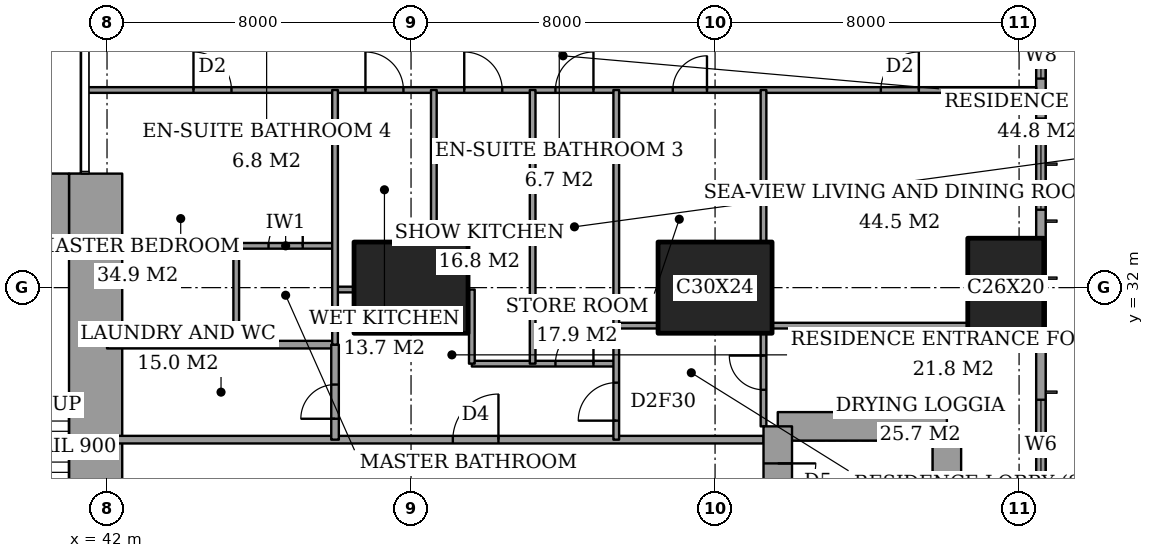
"""IFC4 building model, lengths in metres.
Left out: names, types, materials, properties, quantities, classifications, styles, units other than length and angle.
Written with IfcOpenShell. Run it as: python <this file> out.ifc"""

import sys

from ifc_helpers import new_model, si_unit, direction, frame, frame_2d, origin, origin_2d, place, context, subcontext, project, spatial, rectangle, extrude, element, fill, save


model = new_model("IFC4")
c1 = context("Model", 3, precision=1e-05, world=origin(), true_north=direction((0.0, 1.0)))
c2 = subcontext(c1, "Body", "Model", "MODEL_VIEW")
j1 = project(units=[si_unit("LENGTHUNIT", "METRE"), si_unit("PLANEANGLEUNIT", "RADIAN")], contexts=[c1])
p1 = place(None, origin())
s1 = spatial("IfcSite", under=j1, at=p1, CompositionType="ELEMENT")
p2 = place(p1, origin())
s2 = spatial("IfcBuilding", under=s1, at=p2, CompositionType="ELEMENT")
p3 = place(p2, frame((0.0, 0.0, 58.4)))
s3 = spatial("IfcBuildingStorey", under=s2, at=p3, CompositionType="ELEMENT", Elevation=58.4)
for number, where, z_axis, x_axis in (
    (1, (50.0, 32.0, 0.0), (0.0, 0.0, 1.0), (1.0, 0.0, 0.0)),
    (2, (58.0, 32.0, 0.0), (0.0, 0.0, 1.0), (1.0, 0.0, 0.0)),
):
    element("IfcColumn", number, at=place(p3, frame(where, z_axis=z_axis, x_axis=x_axis)), inside=s3, PredefinedType="COLUMN", context=c2, shape_type="SweptSolid", body=[
        extrude(rectangle(XDim=3.0, YDim=2.4, at=origin_2d()), origin(), (0.0, 0.0, 1.0), 3.6),
    ])
p4 = place(p3, frame((65.65, 32.0, 0.0), z_axis=(0.0, 0.0, 1.0), x_axis=(0.0, 1.0, 0.0)))
e3 = element("IfcColumn", 3, at=p4, inside=s3, PredefinedType="COLUMN", context=c2, shape_type="SweptSolid", body=[
    extrude(rectangle(XDim=2.6, YDim=2.0, at=origin_2d()), origin(), (0.0, 0.0, 1.0), 3.6),
])
p5 = place(p3, frame((37.85, 34.0, 0.0), z_axis=(0.0, 0.0, 1.0), x_axis=(1.0, 0.0, 0.0)))
e4 = element("IfcWall", 4, at=p5, inside=s3, PredefinedType="SHEAR", context=c2, shape_type="SweptSolid", body=[
    extrude(rectangle(XDim=3.15, YDim=2.0, at=frame_2d((1.575, 0.0))), origin(), (0.0, 0.0, 1.0), 3.6),
])
p6 = place(p3, frame((41.7, 24.85, 0.0), z_axis=(0.0, 0.0, 1.0), x_axis=(0.0, 1.0, 0.0)))
e5 = element("IfcWall", 5, at=p6, inside=s3, PredefinedType="SHEAR", context=c2, shape_type="SweptSolid", body=[
    extrude(rectangle(XDim=10.15, YDim=1.4, at=frame_2d((5.075, 0.0))), origin(), (0.0, 0.0, 1.0), 3.6),
])
p7 = place(p3, frame((64.1, 19.65, 0.0), z_axis=(0.0, 0.0, 1.0), x_axis=(0.0, 1.0, 0.0)))
e6 = element("IfcWall", 6, at=p7, inside=s3, PredefinedType="SHEAR", context=c2, shape_type="SweptSolid", body=[
    extrude(rectangle(XDim=8.7, YDim=0.75, at=frame_2d((4.35, 0.0))), origin(), (0.0, 0.0, 1.0), 3.6),
])
p8 = place(p3, frame((64.1, 28.35, 0.0), z_axis=(0.0, 0.0, 1.0), x_axis=(-1.0, 0.0, 0.0)))
e7 = element("IfcWall", 7, at=p8, inside=s3, PredefinedType="SHEAR", context=c2, shape_type="SweptSolid", body=[
    extrude(rectangle(XDim=4.45, YDim=0.75, at=frame_2d((2.225, 0.0))), origin(), (0.0, 0.0, 1.0), 3.6),
])
p9 = place(p3, frame((59.65, 28.35, 0.0), z_axis=(0.0, 0.0, 1.0), x_axis=(0.0, -1.0, 0.0)))
e8 = element("IfcWall", 8, at=p9, inside=s3, PredefinedType="SHEAR", context=c2, shape_type="SweptSolid", body=[
    extrude(rectangle(XDim=8.7, YDim=0.75, at=frame_2d((4.35, 0.0))), origin(), (0.0, 0.0, 1.0), 3.6),
])
p10 = place(p9, frame((0.975, 0.0, 0.0)))
e9 = element("IfcOpeningElement", 9, at=p10, cuts=e8, PredefinedType="OPENING", context=c2, shape_type="SweptSolid", body=[
    extrude(rectangle(XDim=1.0, YDim=2.1, at=frame_2d((0.5, 1.05))), frame((0.0, 0.385, 0.0), z_axis=(0.0, -1.0, 0.0), x_axis=(1.0, 0.0, 0.0)), (0.0, 0.0, 1.0), 0.77),
])
p11 = place(p3, frame((66.575, 3.175, 0.0), z_axis=(0.0, 0.0, 1.0), x_axis=(0.0, 1.0, 0.0)))
e10 = element("IfcWall", 10, at=p11, inside=s3, PredefinedType="SOLIDWALL", context=c2, shape_type="SweptSolid", body=[
    extrude(rectangle(XDim=41.65, YDim=0.25, at=frame_2d((20.825, 0.0))), origin(), (0.0, 0.0, 1.0), 3.6),
])
p12 = place(p11, frame((0.775, 0.0, 0.6)))
e11 = element("IfcOpeningElement", 11, at=p12, cuts=e10, PredefinedType="OPENING", context=c2, shape_type="SweptSolid", body=[
    extrude(rectangle(XDim=2.4, YDim=2.0, at=frame_2d((1.2, 1.0))), frame((0.0, 0.135, 0.0), z_axis=(0.0, -1.0, 0.0), x_axis=(1.0, 0.0, 0.0)), (0.0, 0.0, 1.0), 0.27),
])
p13 = place(p11, frame((6.1, 0.0, 0.6)))
e12 = element("IfcOpeningElement", 12, at=p13, cuts=e10, PredefinedType="OPENING", context=c2, shape_type="SweptSolid", body=[
    extrude(rectangle(XDim=1.2, YDim=2.0, at=frame_2d((0.6, 1.0))), frame((0.0, 0.135, 0.0), z_axis=(0.0, -1.0, 0.0), x_axis=(1.0, 0.0, 0.0)), (0.0, 0.0, 1.0), 0.27),
])
p14 = place(p11, frame((8.275, 0.0, 0.6)))
e13 = element("IfcOpeningElement", 13, at=p14, cuts=e10, PredefinedType="OPENING", context=c2, shape_type="SweptSolid", body=[
    extrude(rectangle(XDim=2.4, YDim=2.0, at=frame_2d((1.2, 1.0))), frame((0.0, 0.135, 0.0), z_axis=(0.0, -1.0, 0.0), x_axis=(1.0, 0.0, 0.0)), (0.0, 0.0, 1.0), 0.27),
])
p15 = place(p11, frame((15.775, 0.0, 0.6)))
e14 = element("IfcOpeningElement", 14, at=p15, cuts=e10, PredefinedType="OPENING", context=c2, shape_type="SweptSolid", body=[
    extrude(rectangle(XDim=2.4, YDim=2.0, at=frame_2d((1.2, 1.0))), frame((0.0, 0.135, 0.0), z_axis=(0.0, -1.0, 0.0), x_axis=(1.0, 0.0, 0.0)), (0.0, 0.0, 1.0), 0.27),
])
p16 = place(p11, frame((23.475, 0.0, 0.6)))
e15 = element("IfcOpeningElement", 15, at=p16, cuts=e10, PredefinedType="OPENING", context=c2, shape_type="SweptSolid", body=[
    extrude(rectangle(XDim=2.4, YDim=2.0, at=frame_2d((1.2, 1.0))), frame((0.0, 0.135, 0.0), z_axis=(0.0, -1.0, 0.0), x_axis=(1.0, 0.0, 0.0)), (0.0, 0.0, 1.0), 0.27),
])
p17 = place(p11, frame((30.875, 0.0, 0.6)))
e16 = element("IfcOpeningElement", 16, at=p17, cuts=e10, PredefinedType="OPENING", context=c2, shape_type="SweptSolid", body=[
    extrude(rectangle(XDim=2.4, YDim=2.0, at=frame_2d((1.2, 1.0))), frame((0.0, 0.135, 0.0), z_axis=(0.0, -1.0, 0.0), x_axis=(1.0, 0.0, 0.0)), (0.0, 0.0, 1.0), 0.27),
])
p18 = place(p11, frame((34.325, 0.0, 0.6)))
e17 = element("IfcOpeningElement", 17, at=p18, cuts=e10, PredefinedType="OPENING", context=c2, shape_type="SweptSolid", body=[
    extrude(rectangle(XDim=1.2, YDim=2.0, at=frame_2d((0.6, 1.0))), frame((0.0, 0.135, 0.0), z_axis=(0.0, -1.0, 0.0), x_axis=(1.0, 0.0, 0.0)), (0.0, 0.0, 1.0), 0.27),
])
p19 = place(p11, frame((38.475, 0.0, 0.6)))
e18 = element("IfcOpeningElement", 18, at=p19, cuts=e10, PredefinedType="OPENING", context=c2, shape_type="SweptSolid", body=[
    extrude(rectangle(XDim=2.4, YDim=2.0, at=frame_2d((1.2, 1.0))), frame((0.0, 0.135, 0.0), z_axis=(0.0, -1.0, 0.0), x_axis=(1.0, 0.0, 0.0)), (0.0, 0.0, 1.0), 0.27),
])
p20 = place(p3, frame((42.0, 28.0, 0.0), z_axis=(0.0, 0.0, 1.0), x_axis=(1.0, 0.0, 0.0)))
e19 = element("IfcWall", 19, at=p20, inside=s3, PredefinedType="PARTITIONING", context=c2, shape_type="SweptSolid", body=[
    extrude(rectangle(XDim=17.275, YDim=0.2, at=frame_2d((8.637, 0.0))), origin(), (0.0, 0.0, 1.0), 3.35),
])
p21 = place(p20, frame((9.1, 0.0, 0.0)))
e20 = element("IfcOpeningElement", 20, at=p21, cuts=e19, PredefinedType="OPENING", context=c2, shape_type="SweptSolid", body=[
    extrude(rectangle(XDim=1.2, YDim=2.4, at=frame_2d((0.6, 1.2))), frame((0.0, 0.11, 0.0), z_axis=(0.0, -1.0, 0.0), x_axis=(1.0, 0.0, 0.0)), (0.0, 0.0, 1.0), 0.22),
])
p22 = place(p3, frame((51.6, 30.0, 0.0), z_axis=(0.0, 0.0, 1.0), x_axis=(1.0, 0.0, 0.0)))
e21 = element("IfcWall", 21, at=p22, inside=s3, PredefinedType="PARTITIONING", context=c2, shape_type="SweptSolid", body=[
    extrude(rectangle(XDim=3.8, YDim=0.15, at=frame_2d((1.9, 0.0))), origin(), (0.0, 0.0, 1.0), 3.35),
])
p23 = place(p22, frame((2.2, 0.0, 0.0)))
e22 = element("IfcOpeningElement", 22, at=p23, cuts=e21, PredefinedType="OPENING", context=c2, shape_type="SweptSolid", body=[
    extrude(rectangle(XDim=1.0, YDim=2.1, at=frame_2d((0.5, 1.05))), frame((0.0, 0.085, 0.0), z_axis=(0.0, -1.0, 0.0), x_axis=(1.0, 0.0, 0.0)), (0.0, 0.0, 1.0), 0.17),
])
p24 = place(p3, frame((42.0, 30.5, 0.0), z_axis=(0.0, 0.0, 1.0), x_axis=(1.0, 0.0, 0.0)))
e23 = element("IfcWall", 23, at=p24, inside=s3, PredefinedType="PARTITIONING", context=c2, shape_type="SweptSolid", body=[
    extrude(rectangle(XDim=6.0, YDim=0.2, at=frame_2d((3.0, 0.0))), origin(), (0.0, 0.0, 1.0), 3.35),
])
p25 = place(p3, frame((55.4, 31.0, 0.0), z_axis=(0.0, 0.0, 1.0), x_axis=(1.0, 0.0, 0.0)))
e24 = element("IfcWall", 24, at=p25, inside=s3, PredefinedType="PARTITIONING", context=c2, shape_type="SweptSolid", body=[
    extrude(rectangle(XDim=1.1, YDim=0.15, at=frame_2d((0.55, 0.0))), origin(), (0.0, 0.0, 1.0), 3.35),
])
p26 = place(p3, frame((59.5, 31.0, 0.0), z_axis=(0.0, 0.0, 1.0), x_axis=(1.0, 0.0, 0.0)))
e25 = element("IfcWall", 25, at=p26, inside=s3, PredefinedType="PARTITIONING", context=c2, shape_type="SweptSolid", body=[
    extrude(rectangle(XDim=5.15, YDim=0.15, at=frame_2d((2.575, 0.0))), origin(), (0.0, 0.0, 1.0), 3.35),
])
p27 = place(p3, frame((48.0, 31.95, 0.0), z_axis=(0.0, 0.0, 1.0), x_axis=(1.0, 0.0, 0.0)))
e26 = element("IfcWall", 26, at=p27, inside=s3, PredefinedType="PARTITIONING", context=c2, shape_type="SweptSolid", body=[
    extrude(rectangle(XDim=0.5, YDim=0.15, at=frame_2d((0.25, 0.0))), origin(), (0.0, 0.0, 1.0), 2.634),
])
p28 = place(p3, frame((45.4, 33.1, 0.0), z_axis=(0.0, 0.0, 1.0), x_axis=(1.0, 0.0, 0.0)))
e27 = element("IfcWall", 27, at=p28, inside=s3, PredefinedType="PARTITIONING", context=c2, shape_type="SweptSolid", body=[
    extrude(rectangle(XDim=2.6, YDim=0.15, at=frame_2d((1.3, 0.0))), origin(), (0.0, 0.0, 1.0), 3.35),
])
p29 = place(p28, frame((0.85, 0.0, 0.0)))
e28 = element("IfcOpeningElement", 28, at=p29, cuts=e27, PredefinedType="OPENING", context=c2, shape_type="SweptSolid", body=[
    extrude(rectangle(XDim=0.9, YDim=2.1, at=frame_2d((0.45, 1.05))), frame((0.0, 0.085, 0.0), z_axis=(0.0, -1.0, 0.0), x_axis=(1.0, 0.0, 0.0)), (0.0, 0.0, 1.0), 0.17),
])
p30 = place(p3, frame((41.439, 37.2, 0.0), z_axis=(0.0, 0.0, 1.0), x_axis=(1.0, 0.0, 0.0)))
e29 = element("IfcWall", 29, at=p30, inside=s3, PredefinedType="PARTITIONING", context=c2, shape_type="SweptSolid", body=[
    extrude(rectangle(XDim=25.011, YDim=0.15, at=frame_2d((12.505, 0.0))), origin(), (0.0, 0.0, 1.0), 3.35),
])
p31 = place(p30, frame((12.361, 0.0, 0.0)))
e30 = element("IfcOpeningElement", 30, at=p31, cuts=e29, PredefinedType="OPENING", context=c2, shape_type="SweptSolid", body=[
    extrude(rectangle(XDim=1.0, YDim=2.1, at=frame_2d((0.5, 1.05))), frame((0.0, 0.085, 0.0), z_axis=(0.0, -1.0, 0.0), x_axis=(1.0, 0.0, 0.0)), (0.0, 0.0, 1.0), 0.17),
])
p32 = place(p30, frame((20.924, 0.0, 0.0)))
e31 = element("IfcOpeningElement", 31, at=p32, cuts=e29, PredefinedType="OPENING", context=c2, shape_type="SweptSolid", body=[
    extrude(rectangle(XDim=1.0, YDim=2.1, at=frame_2d((0.5, 1.05))), frame((0.0, 0.085, 0.0), z_axis=(0.0, -1.0, 0.0), x_axis=(1.0, 0.0, 0.0)), (0.0, 0.0, 1.0), 0.17),
])
p33 = place(p30, frame((15.448, 0.0, 0.0)))
e32 = element("IfcOpeningElement", 32, at=p33, cuts=e29, PredefinedType="OPENING", context=c2, shape_type="SweptSolid", body=[
    extrude(rectangle(XDim=0.9, YDim=2.1, at=frame_2d((0.45, 1.05))), frame((0.0, 0.085, 0.0), z_axis=(0.0, -1.0, 0.0), x_axis=(1.0, 0.0, 0.0)), (0.0, 0.0, 1.0), 0.17),
])
p34 = place(p30, frame((9.961, 0.0, 0.0)))
e33 = element("IfcOpeningElement", 33, at=p34, cuts=e29, PredefinedType="OPENING", context=c2, shape_type="SweptSolid", body=[
    extrude(rectangle(XDim=1.0, YDim=2.1, at=frame_2d((0.5, 1.05))), frame((0.0, 0.085, 0.0), z_axis=(0.0, -1.0, 0.0), x_axis=(1.0, 0.0, 0.0)), (0.0, 0.0, 1.0), 0.17),
])
p35 = place(p30, frame((7.361, 0.0, 0.0)))
e34 = element("IfcOpeningElement", 34, at=p35, cuts=e29, PredefinedType="OPENING", context=c2, shape_type="SweptSolid", body=[
    extrude(rectangle(XDim=1.0, YDim=2.1, at=frame_2d((0.5, 1.05))), frame((0.0, 0.085, 0.0), z_axis=(0.0, -1.0, 0.0), x_axis=(1.0, 0.0, 0.0)), (0.0, 0.0, 1.0), 0.17),
])
p36 = place(p30, frame((2.836, 0.0, 0.0)))
e35 = element("IfcOpeningElement", 35, at=p36, cuts=e29, PredefinedType="OPENING", context=c2, shape_type="SweptSolid", body=[
    extrude(rectangle(XDim=1.0, YDim=2.1, at=frame_2d((0.5, 1.05))), frame((0.0, 0.085, 0.0), z_axis=(0.0, -1.0, 0.0), x_axis=(1.0, 0.0, 0.0)), (0.0, 0.0, 1.0), 0.17),
])
p37 = place(p3, frame((45.4, 30.5, 0.0), z_axis=(0.0, 0.0, 1.0), x_axis=(0.0, 1.0, 0.0)))
e36 = element("IfcWall", 36, at=p37, inside=s3, PredefinedType="PARTITIONING", context=c2, shape_type="SweptSolid", body=[
    extrude(rectangle(XDim=2.6, YDim=0.15, at=frame_2d((1.3, 0.0))), origin(), (0.0, 0.0, 1.0), 3.35),
])
p38 = place(p3, frame((48.0, 28.0, 0.0), z_axis=(0.0, 0.0, 1.0), x_axis=(0.0, 1.0, 0.0)))
e37 = element("IfcWall", 37, at=p38, inside=s3, PredefinedType="PARTITIONING", context=c2, shape_type="SweptSolid", body=[
    extrude(rectangle(XDim=2.5, YDim=0.2, at=frame_2d((1.25, 0.0))), origin(), (0.0, 0.0, 1.0), 3.35),
])
p39 = place(p38, frame((0.55, 0.0, 0.0)))
e38 = element("IfcOpeningElement", 38, at=p39, cuts=e37, PredefinedType="OPENING", context=c2, shape_type="SweptSolid", body=[
    extrude(rectangle(XDim=0.9, YDim=2.1, at=frame_2d((0.45, 1.05))), frame((0.0, 0.11, 0.0), z_axis=(0.0, -1.0, 0.0), x_axis=(1.0, 0.0, 0.0)), (0.0, 0.0, 1.0), 0.22),
])
p40 = place(p3, frame((48.0, 30.5, 0.0), z_axis=(0.0, 0.0, 1.0), x_axis=(0.0, 1.0, 0.0)))
e39 = element("IfcWall", 39, at=p40, inside=s3, PredefinedType="PARTITIONING", context=c2, shape_type="SweptSolid", body=[
    extrude(rectangle(XDim=6.7, YDim=0.15, at=frame_2d((3.35, 0.0))), origin(), (0.0, 0.0, 1.0), 3.35),
])
p41 = place(p3, frame((50.6, 33.2, 0.0), z_axis=(0.0, 0.0, 1.0), x_axis=(0.0, 1.0, 0.0)))
e40 = element("IfcWall", 40, at=p41, inside=s3, PredefinedType="PARTITIONING", context=c2, shape_type="SweptSolid", body=[
    extrude(rectangle(XDim=4.0, YDim=0.15, at=frame_2d((2.0, 0.0))), origin(), (0.0, 0.0, 1.0), 3.35),
])
p42 = place(p3, frame((51.6, 30.0, 0.0), z_axis=(0.0, 0.0, 1.0), x_axis=(0.0, 1.0, 0.0)))
e41 = element("IfcWall", 41, at=p42, inside=s3, PredefinedType="PARTITIONING", context=c2, shape_type="SweptSolid", body=[
    extrude(rectangle(XDim=1.95, YDim=0.15, at=frame_2d((0.975, 0.0))), origin(), (0.0, 0.0, 1.0), 3.35),
])
p43 = place(p3, frame((53.2, 30.0, 0.0), z_axis=(0.0, 0.0, 1.0), x_axis=(0.0, 1.0, 0.0)))
e42 = element("IfcWall", 42, at=p43, inside=s3, PredefinedType="PARTITIONING", context=c2, shape_type="SweptSolid", body=[
    extrude(rectangle(XDim=7.2, YDim=0.15, at=frame_2d((3.6, 0.0))), origin(), (0.0, 0.0, 1.0), 3.35),
])
p44 = place(p3, frame((55.4, 28.0, 0.0), z_axis=(0.0, 0.0, 1.0), x_axis=(0.0, 1.0, 0.0)))
e43 = element("IfcWall", 43, at=p44, inside=s3, PredefinedType="PARTITIONING", context=c2, shape_type="SweptSolid", body=[
    extrude(rectangle(XDim=9.2, YDim=0.15, at=frame_2d((4.6, 0.0))), origin(), (0.0, 0.0, 1.0), 3.35),
])
p45 = place(p44, frame((0.5, 0.0, 0.0)))
e44 = element("IfcOpeningElement", 44, at=p45, cuts=e43, PredefinedType="OPENING", context=c2, shape_type="SweptSolid", body=[
    extrude(rectangle(XDim=1.0, YDim=2.1, at=frame_2d((0.5, 1.05))), frame((0.0, 0.085, 0.0), z_axis=(0.0, -1.0, 0.0), x_axis=(1.0, 0.0, 0.0)), (0.0, 0.0, 1.0), 0.17),
])
p46 = place(p3, frame((59.275, 28.35, 0.0), z_axis=(0.0, 0.0, 1.0), x_axis=(0.0, 1.0, 0.0)))
e45 = element("IfcWall", 45, at=p46, inside=s3, PredefinedType="PARTITIONING", context=c2, shape_type="SweptSolid", body=[
    extrude(rectangle(XDim=2.45, YDim=0.15, at=frame_2d((1.225, 0.0))), origin(), (0.0, 0.0, 1.0), 3.35),
])
p47 = place(p46, frame((0.962, 0.0, 0.0)))
e46 = element("IfcOpeningElement", 46, at=p47, cuts=e45, PredefinedType="OPENING", context=c2, shape_type="SweptSolid", body=[
    extrude(rectangle(XDim=0.9, YDim=2.1, at=frame_2d((0.45, 1.05))), frame((0.0, 0.085, 0.0), z_axis=(0.0, -1.0, 0.0), x_axis=(1.0, 0.0, 0.0)), (0.0, 0.0, 1.0), 0.17),
])
p48 = place(p3, frame((59.275, 33.2, 0.0), z_axis=(0.0, 0.0, 1.0), x_axis=(0.0, 1.0, 0.0)))
e47 = element("IfcWall", 47, at=p48, inside=s3, PredefinedType="PARTITIONING", context=c2, shape_type="SweptSolid", body=[
    extrude(rectangle(XDim=4.0, YDim=0.15, at=frame_2d((2.0, 0.0))), origin(), (0.0, 0.0, 1.0), 3.35),
])
p49 = place(p16, origin())
e48 = element("IfcWindow", 48, at=p49, inside=s3, PartitioningType="SINGLE_PANEL", PredefinedType="WINDOW", context=c2, shape_type="SweptSolid", body=[
    extrude(rectangle(XDim=2.4, YDim=2.0, at=frame_2d((1.2, 1.0))), frame((0.0, 0.03, 0.0), z_axis=(0.0, -1.0, 0.0), x_axis=(1.0, 0.0, 0.0)), (0.0, 0.0, 1.0), 0.06),
])
fill(e15, e48)
p50 = place(p17, origin())
e49 = element("IfcWindow", 49, at=p50, inside=s3, PartitioningType="SINGLE_PANEL", PredefinedType="WINDOW", context=c2, shape_type="SweptSolid", body=[
    extrude(rectangle(XDim=2.4, YDim=2.0, at=frame_2d((1.2, 1.0))), frame((0.0, 0.03, 0.0), z_axis=(0.0, -1.0, 0.0), x_axis=(1.0, 0.0, 0.0)), (0.0, 0.0, 1.0), 0.06),
])
fill(e16, e49)
p51 = place(p18, origin())
e50 = element("IfcWindow", 50, at=p51, inside=s3, PartitioningType="SINGLE_PANEL", PredefinedType="WINDOW", context=c2, shape_type="SweptSolid", body=[
    extrude(rectangle(XDim=1.2, YDim=2.0, at=frame_2d((0.6, 1.0))), frame((0.0, 0.03, 0.0), z_axis=(0.0, -1.0, 0.0), x_axis=(1.0, 0.0, 0.0)), (0.0, 0.0, 1.0), 0.06),
])
fill(e17, e50)
p52 = place(p31, origin())
e51 = element("IfcDoor", 51, at=p52, inside=s3, OperationType="SINGLE_SWING_LEFT", PredefinedType="DOOR", context=c2, shape_type="SweptSolid", body=[
    extrude(rectangle(XDim=1.0, YDim=2.1, at=frame_2d((0.5, 1.05))), frame((0.0, 0.025, 0.0), z_axis=(0.0, -1.0, 0.0), x_axis=(1.0, 0.0, 0.0)), (0.0, 0.0, 1.0), 0.05),
])
fill(e30, e51)
p53 = place(p32, origin())
e52 = element("IfcDoor", 52, at=p53, inside=s3, OperationType="SINGLE_SWING_LEFT", PredefinedType="DOOR", context=c2, shape_type="SweptSolid", body=[
    extrude(rectangle(XDim=1.0, YDim=2.1, at=frame_2d((0.5, 1.05))), frame((0.0, 0.025, 0.0), z_axis=(0.0, -1.0, 0.0), x_axis=(1.0, 0.0, 0.0)), (0.0, 0.0, 1.0), 0.05),
])
fill(e31, e52)
p54 = place(p47, origin())
e53 = element("IfcDoor", 53, at=p54, inside=s3, OperationType="SINGLE_SWING_LEFT", PredefinedType="DOOR", context=c2, shape_type="SweptSolid", body=[
    extrude(rectangle(XDim=0.9, YDim=2.1, at=frame_2d((0.45, 1.05))), frame((0.0, 0.025, 0.0), z_axis=(0.0, -1.0, 0.0), x_axis=(1.0, 0.0, 0.0)), (0.0, 0.0, 1.0), 0.05),
])
fill(e46, e53)
p55 = place(p33, origin())
e54 = element("IfcDoor", 54, at=p55, inside=s3, OperationType="SINGLE_SWING_LEFT", PredefinedType="DOOR", context=c2, shape_type="SweptSolid", body=[
    extrude(rectangle(XDim=0.9, YDim=2.1, at=frame_2d((0.45, 1.05))), frame((0.0, 0.025, 0.0), z_axis=(0.0, -1.0, 0.0), x_axis=(1.0, 0.0, 0.0)), (0.0, 0.0, 1.0), 0.05),
])
fill(e32, e54)
p56 = place(p45, origin())
e55 = element("IfcDoor", 55, at=p56, inside=s3, OperationType="SINGLE_SWING_RIGHT", PredefinedType="DOOR", context=c2, shape_type="SweptSolid", body=[
    extrude(rectangle(XDim=1.0, YDim=2.1, at=frame_2d((0.5, 1.05))), frame((0.0, 0.025, 0.0), z_axis=(0.0, -1.0, 0.0), x_axis=(1.0, 0.0, 0.0)), (0.0, 0.0, 1.0), 0.05),
])
fill(e44, e55)
p57 = place(p21, origin())
e56 = element("IfcDoor", 56, at=p57, inside=s3, OperationType="SINGLE_SWING_LEFT", PredefinedType="DOOR", context=c2, shape_type="SweptSolid", body=[
    extrude(rectangle(XDim=1.2, YDim=2.4, at=frame_2d((0.6, 1.2))), frame((0.0, 0.025, 0.0), z_axis=(0.0, -1.0, 0.0), x_axis=(1.0, 0.0, 0.0)), (0.0, 0.0, 1.0), 0.05),
])
fill(e20, e56)
p58 = place(p23, origin())
e57 = element("IfcDoor", 57, at=p58, inside=s3, OperationType="SINGLE_SWING_LEFT", PredefinedType="DOOR", context=c2, shape_type="SweptSolid", body=[
    extrude(rectangle(XDim=1.0, YDim=2.1, at=frame_2d((0.5, 1.05))), frame((0.0, 0.025, 0.0), z_axis=(0.0, -1.0, 0.0), x_axis=(1.0, 0.0, 0.0)), (0.0, 0.0, 1.0), 0.05),
])
fill(e22, e57)
p59 = place(p34, origin())
e58 = element("IfcDoor", 58, at=p59, inside=s3, OperationType="SINGLE_SWING_RIGHT", PredefinedType="DOOR", context=c2, shape_type="SweptSolid", body=[
    extrude(rectangle(XDim=1.0, YDim=2.1, at=frame_2d((0.5, 1.05))), frame((0.0, 0.025, 0.0), z_axis=(0.0, -1.0, 0.0), x_axis=(1.0, 0.0, 0.0)), (0.0, 0.0, 1.0), 0.05),
])
fill(e33, e58)
p60 = place(p35, origin())
e59 = element("IfcDoor", 59, at=p60, inside=s3, OperationType="SINGLE_SWING_RIGHT", PredefinedType="DOOR", context=c2, shape_type="SweptSolid", body=[
    extrude(rectangle(XDim=1.0, YDim=2.1, at=frame_2d((0.5, 1.05))), frame((0.0, 0.025, 0.0), z_axis=(0.0, -1.0, 0.0), x_axis=(1.0, 0.0, 0.0)), (0.0, 0.0, 1.0), 0.05),
])
fill(e34, e59)
p61 = place(p29, origin())
e60 = element("IfcDoor", 60, at=p61, inside=s3, OperationType="SINGLE_SWING_LEFT", PredefinedType="DOOR", context=c2, shape_type="SweptSolid", body=[
    extrude(rectangle(XDim=0.9, YDim=2.1, at=frame_2d((0.45, 1.05))), frame((0.0, 0.025, 0.0), z_axis=(0.0, -1.0, 0.0), x_axis=(1.0, 0.0, 0.0)), (0.0, 0.0, 1.0), 0.05),
])
fill(e28, e60)
p62 = place(p36, origin())
e61 = element("IfcDoor", 61, at=p62, inside=s3, OperationType="SINGLE_SWING_RIGHT", PredefinedType="DOOR", context=c2, shape_type="SweptSolid", body=[
    extrude(rectangle(XDim=1.0, YDim=2.1, at=frame_2d((0.5, 1.05))), frame((0.0, 0.025, 0.0), z_axis=(0.0, -1.0, 0.0), x_axis=(1.0, 0.0, 0.0)), (0.0, 0.0, 1.0), 0.05),
])
fill(e35, e61)
p63 = place(p39, origin())
e62 = element("IfcDoor", 62, at=p63, inside=s3, OperationType="SINGLE_SWING_RIGHT", PredefinedType="DOOR", context=c2, shape_type="SweptSolid", body=[
    extrude(rectangle(XDim=0.9, YDim=2.1, at=frame_2d((0.45, 1.05))), frame((0.0, 0.025, 0.0), z_axis=(0.0, -1.0, 0.0), x_axis=(1.0, 0.0, 0.0)), (0.0, 0.0, 1.0), 0.05),
])
fill(e38, e62)
p64 = place(p10, origin())
e63 = element("IfcDoor", 63, at=p64, inside=s3, OperationType="SINGLE_SWING_RIGHT", PredefinedType="DOOR", context=c2, shape_type="SweptSolid", body=[
    extrude(rectangle(XDim=1.0, YDim=2.1, at=frame_2d((0.5, 1.05))), frame((0.0, 0.025, 0.0), z_axis=(0.0, -1.0, 0.0), x_axis=(1.0, 0.0, 0.0)), (0.0, 0.0, 1.0), 0.05),
])
fill(e9, e63)
save(model, sys.argv[1])
